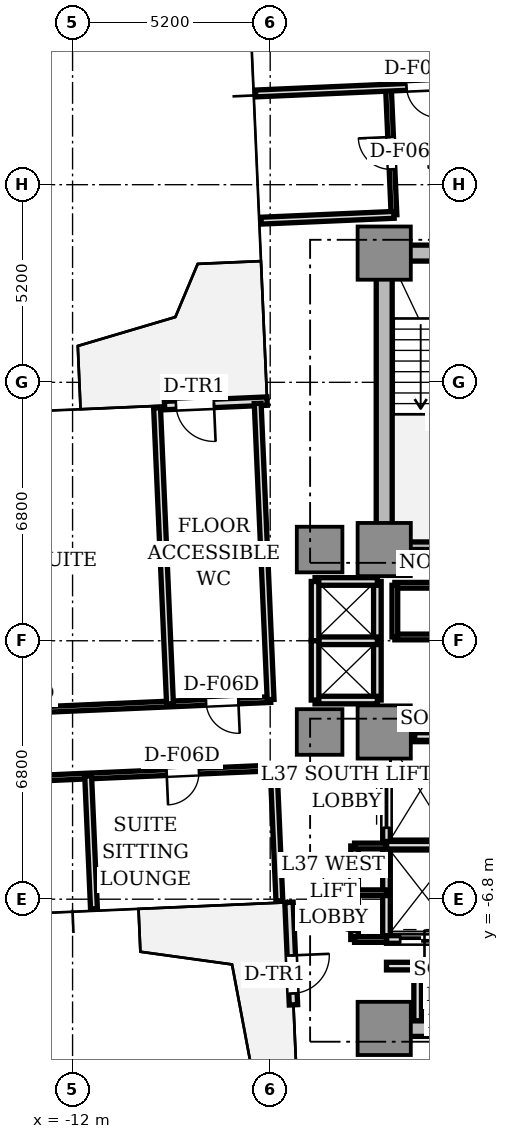
"""IFC4 building model, lengths in metres.
Left out: names, types, materials, properties, quantities, classifications, styles, units other than length and angle.
Written with IfcOpenShell. Run it as: python <this file> out.ifc"""

import sys

from ifc_helpers import new_model, si_unit, direction, frame, frame_2d, origin, origin_2d, place, context, subcontext, project, spatial, rectangle, extrude, source, transform, mapped, element, fill, save


model = new_model("IFC4")
c1 = context("Model", 3, precision=1e-05, world=origin(), true_north=direction((0.0, 1.0)))
c2 = subcontext(c1, "Body", "Model", "MODEL_VIEW")
j1 = project(units=[si_unit("LENGTHUNIT", "METRE"), si_unit("PLANEANGLEUNIT", "RADIAN")], contexts=[c1])
p1 = place(None, origin())
s1 = spatial("IfcSite", under=j1, at=p1, CompositionType="ELEMENT")
p2 = place(p1, origin())
s2 = spatial("IfcBuilding", under=s1, at=p2, CompositionType="ELEMENT")
p3 = place(p2, frame((0.0, 0.0, 134.9)))
s3 = spatial("IfcBuildingStorey", under=s2, at=p3, CompositionType="ELEMENT", Elevation=134.9)
p4 = place(p3, frame((-3.55, 10.2, 0.0), z_axis=(0.0, 0.0, 1.0), x_axis=(1.0, 0.0, 0.0)))
e1 = element("IfcWall", 1, at=p4, inside=s3, PredefinedType="SHEAR", context=c2, shape_type="SweptSolid", body=[
    extrude(rectangle(XDim=7.1, YDim=0.42, at=frame_2d((3.55, 0.0))), origin(), (0.0, 0.0, 1.0), 3.03),
])
p5 = place(p3, frame((-3.8, 2.85, 0.0), z_axis=(0.0, 0.0, 1.0), x_axis=(0.0, 1.0, 0.0)))
e2 = element("IfcWall", 2, at=p5, inside=s3, PredefinedType="SHEAR", context=c2, shape_type="SweptSolid", body=[
    extrude(rectangle(XDim=6.9, YDim=0.42, at=frame_2d((3.45, 0.0))), origin(), (0.0, 0.0, 1.0), 3.03),
])
p6 = place(p3, frame((-3.55, -10.2, 0.0), z_axis=(0.0, 0.0, 1.0), x_axis=(1.0, 0.0, 0.0)))
e3 = element("IfcWall", 3, at=p6, inside=s3, PredefinedType="SHEAR", context=c2, shape_type="SweptSolid", body=[
    extrude(rectangle(XDim=7.1, YDim=0.42, at=frame_2d((3.55, 0.0))), origin(), (0.0, 0.0, 1.0), 3.03),
])
m1 = source(origin(), c2, "Body", "SweptSolid", [
    extrude(rectangle(XDim=1.4, YDim=1.4, at=origin_2d()), origin(), (0.0, 0.0, 1.0), 3.03),
])
for number, where, z_axis, x_axis in (
    (4, (-3.8, 2.4, 0.0), (0.0, 0.0, 1.0), (1.0, 0.0, 0.0)),
    (5, (-3.8, 10.2, 0.0), (0.0, 0.0, 1.0), (1.0, 0.0, 0.0)),
    (6, (-3.8, -2.4, 0.0), (0.0, 0.0, 1.0), (1.0, 0.0, 0.0)),
    (7, (-3.8, -10.2, 0.0), (0.0, 0.0, 1.0), (1.0, 0.0, 0.0)),
):
    element("IfcColumn", number, at=place(p3, frame(where, z_axis=z_axis, x_axis=x_axis)), inside=s3, PredefinedType="COLUMN", context=c2, shape_type="MappedRepresentation", body=[
        mapped(m1, transform((0.0, 0.0, 0.0), scale=1.0)),
    ])
m2 = source(origin(), c2, "Body", "SweptSolid", [
    extrude(rectangle(XDim=1.2, YDim=1.2, at=origin_2d()), origin(), (0.0, 0.0, 1.0), 3.03),
])
for number, where, z_axis, x_axis in (
    (8, (-5.5, 2.4, 0.0), (0.0, 0.0, 1.0), (1.0, 0.0, 0.0)),
    (9, (-5.5, -2.4, 0.0), (0.0, 0.0, 1.0), (1.0, 0.0, 0.0)),
):
    element("IfcColumn", number, at=place(p3, frame(where, z_axis=z_axis, x_axis=x_axis)), inside=s3, PredefinedType="COLUMN", context=c2, shape_type="MappedRepresentation", body=[
        mapped(m2, transform((0.0, 0.0, 0.0), scale=1.0)),
    ])
p7 = place(p3, frame((-6.882, 6.306, 0.0), z_axis=(0.0, 0.0, 1.0), x_axis=(-0.999045894436, -0.043672655174, 0.0)))
e10 = element("IfcWall", 10, at=p7, inside=s3, PredefinedType="STANDARD", context=c2, shape_type="SweptSolid", body=[
    extrude(rectangle(XDim=2.7, YDim=0.22, at=frame_2d((1.35, 0.0))), origin(), (0.0, 0.0, 1.0), 3.03),
])
p8 = place(p7, frame((1.4, 0.0, 0.0)))
e11 = element("IfcOpeningElement", 11, at=p8, cuts=e10, PredefinedType="OPENING", context=c2, shape_type="SweptSolid", body=[
    extrude(rectangle(XDim=1.0, YDim=2.2, at=frame_2d((0.5, 1.1))), frame((0.0, 0.12, 0.0), z_axis=(0.0, -1.0, 0.0), x_axis=(1.0, 0.0, 0.0)), (0.0, 0.0, 1.0), 0.24),
])
p9 = place(p3, frame((-6.306, -6.882, 0.0), z_axis=(0.0, 0.0, 1.0), x_axis=(0.043672655174, -0.999045894436, 0.0)))
e12 = element("IfcWall", 12, at=p9, inside=s3, PredefinedType="STANDARD", context=c2, shape_type="SweptSolid", body=[
    extrude(rectangle(XDim=2.7, YDim=0.22, at=frame_2d((1.35, 0.0))), origin(), (0.0, 0.0, 1.0), 3.03),
])
p10 = place(p9, frame((1.4, 0.0, 0.0)))
e13 = element("IfcOpeningElement", 13, at=p10, cuts=e12, PredefinedType="OPENING", context=c2, shape_type="SweptSolid", body=[
    extrude(rectangle(XDim=1.0, YDim=2.2, at=frame_2d((0.5, 1.1))), frame((0.0, 0.12, 0.0), z_axis=(0.0, -1.0, 0.0), x_axis=(1.0, 0.0, 0.0)), (0.0, 0.0, 1.0), 0.24),
])
p11 = place(p3, frame((-3.72, 2.5, 0.0), z_axis=(0.0, 0.0, 1.0), x_axis=(1.0, 0.0, 0.0)))
e14 = element("IfcWall", 14, at=p11, inside=s3, PredefinedType="SOLIDWALL", context=c2, shape_type="SweptSolid", body=[
    extrude(rectangle(XDim=3.72, YDim=0.2, at=frame_2d((1.86, 0.0))), origin(), (0.0, 0.0, 1.0), 3.03),
])
p12 = place(p3, frame((-3.0, -2.52, 0.0), z_axis=(0.0, 0.0, 1.0), x_axis=(1.0, 0.0, 0.0)))
e15 = element("IfcWall", 15, at=p12, inside=s3, PredefinedType="SOLIDWALL", context=c2, shape_type="SweptSolid", body=[
    extrude(rectangle(XDim=1.0, YDim=0.2, at=frame_2d((0.5, 0.0))), origin(), (0.0, 0.0, 1.0), 2.58),
])
p13 = place(p3, frame((-3.74, -5.36, 0.0), z_axis=(0.0, 0.0, 1.0), x_axis=(0.0, 1.0, 0.0)))
e16 = element("IfcWall", 16, at=p13, inside=s3, PredefinedType="SOLIDWALL", context=c2, shape_type="SweptSolid", body=[
    extrude(rectangle(XDim=2.08, YDim=0.2, at=frame_2d((1.04, 0.0))), origin(), (0.0, 0.0, 1.0), 2.58),
])
p14 = place(p13, frame((0.44, 0.0, 0.0)))
e17 = element("IfcOpeningElement", 17, at=p14, cuts=e16, PredefinedType="OPENING", context=c2, shape_type="SweptSolid", body=[
    extrude(rectangle(XDim=1.2, YDim=2.2, at=frame_2d((0.6, 1.1))), frame((0.0, 0.11, 0.0), z_axis=(0.0, -1.0, 0.0), x_axis=(1.0, 0.0, 0.0)), (0.0, 0.0, 1.0), 0.22),
])
p15 = place(p3, frame((-3.74, -7.86, 0.0), z_axis=(0.0, 0.0, 1.0), x_axis=(0.0, 1.0, 0.0)))
e18 = element("IfcWall", 18, at=p15, inside=s3, PredefinedType="SOLIDWALL", context=c2, shape_type="SweptSolid", body=[
    extrude(rectangle(XDim=2.48, YDim=0.2, at=frame_2d((1.24, 0.0))), origin(), (0.0, 0.0, 1.0), 2.58),
])
p16 = place(p3, frame((-3.74, -7.86, 0.0), z_axis=(0.0, 0.0, 1.0), x_axis=(1.0, 0.0, 0.0)))
e19 = element("IfcWall", 19, at=p16, inside=s3, PredefinedType="SOLIDWALL", context=c2, shape_type="SweptSolid", body=[
    extrude(rectangle(XDim=1.84, YDim=0.2, at=frame_2d((0.92, 0.0))), origin(), (0.0, 0.0, 1.0), 2.58),
])
p17 = place(p16, frame((0.36, 0.0, 0.0)))
e20 = element("IfcOpeningElement", 20, at=p17, cuts=e19, PredefinedType="OPENING", context=c2, shape_type="SweptSolid", body=[
    extrude(rectangle(XDim=1.1, YDim=2.2, at=frame_2d((0.55, 1.1))), frame((0.0, 0.11, 0.0), z_axis=(0.0, -1.0, 0.0), x_axis=(1.0, 0.0, 0.0)), (0.0, 0.0, 1.0), 0.22),
])
p18 = place(p3, frame((-3.74, -5.38, 0.0), z_axis=(0.0, 0.0, 1.0), x_axis=(1.0, 0.0, 0.0)))
e21 = element("IfcWall", 21, at=p18, inside=s3, PredefinedType="SOLIDWALL", context=c2, shape_type="SweptSolid", body=[
    extrude(rectangle(XDim=3.69, YDim=0.2, at=frame_2d((1.845, 0.0))), origin(), (0.0, 0.0, 1.0), 2.58),
])
p19 = place(p3, frame((-3.98, -1.56, 0.0), z_axis=(0.0, 0.0, 1.0), x_axis=(0.0, 1.0, 0.0)))
e22 = element("IfcWall", 22, at=p19, inside=s3, PredefinedType="SOLIDWALL", context=c2, shape_type="SweptSolid", body=[
    extrude(rectangle(XDim=3.12, YDim=0.2, at=frame_2d((1.56, 0.0))), origin(), (0.0, 0.0, 1.0), 2.2),
])
for number, where, z_axis, x_axis in (
    (23, (-5.62, 1.56, 0.0), (0.0, 0.0, 1.0), (1.0, 0.0, 0.0)),
    (24, (-5.62, -1.56, 0.0), (0.0, 0.0, 1.0), (1.0, 0.0, 0.0)),
    (25, (-5.62, 0.0, 0.0), (0.0, 0.0, 1.0), (1.0, 0.0, 0.0)),
):
    element("IfcWall", number, at=place(p3, frame(where, z_axis=z_axis, x_axis=x_axis)), inside=s3, PredefinedType="SOLIDWALL", context=c2, shape_type="SweptSolid", body=[
        extrude(rectangle(XDim=1.64, YDim=0.2, at=frame_2d((0.82, 0.0))), origin(), (0.0, 0.0, 1.0), 2.58),
    ])
for number, where, z_axis, x_axis in (
    (26, (-5.62, 0.0, 0.0), (0.0, 0.0, 1.0), (0.0, 1.0, 0.0)),
    (27, (-5.62, -1.56, 0.0), (0.0, 0.0, 1.0), (0.0, 1.0, 0.0)),
):
    element("IfcWall", number, at=place(p3, frame(where, z_axis=z_axis, x_axis=x_axis)), inside=s3, PredefinedType="SOLIDWALL", context=c2, shape_type="SweptSolid", body=[
        extrude(rectangle(XDim=1.56, YDim=0.2, at=frame_2d((0.78, 0.0))), origin(), (0.0, 0.0, 1.0), 2.58),
    ])
p20 = place(p3, frame((-3.74, -8.56, 0.0), z_axis=(0.0, 0.0, 1.0), x_axis=(1.0, 0.0, 0.0)))
e28 = element("IfcWall", 28, at=p20, inside=s3, PredefinedType="SOLIDWALL", context=c2, shape_type="SweptSolid", body=[
    extrude(rectangle(XDim=3.62, YDim=0.2, at=frame_2d((1.81, 0.0))), origin(), (0.0, 0.0, 1.0), 2.58),
])
p21 = place(p20, frame((1.0, 0.0, 0.0)))
e29 = element("IfcOpeningElement", 29, at=p21, cuts=e28, PredefinedType="OPENING", context=c2, shape_type="SweptSolid", body=[
    extrude(rectangle(XDim=0.95, YDim=2.15, at=frame_2d((0.475, 1.075))), frame((0.0, 0.11, 0.0), z_axis=(0.0, -1.0, 0.0), x_axis=(1.0, 0.0, 0.0)), (0.0, 0.0, 1.0), 0.22),
])
p22 = place(p3, frame((-2.92, -10.0, 0.0), z_axis=(0.0, 0.0, 1.0), x_axis=(0.0, 1.0, 0.0)))
e30 = element("IfcWall", 30, at=p22, inside=s3, PredefinedType="SOLIDWALL", context=c2, shape_type="SweptSolid", body=[
    extrude(rectangle(XDim=1.44, YDim=0.2, at=frame_2d((0.72, 0.0))), origin(), (0.0, 0.0, 1.0), 2.58),
])
p23 = place(p3, frame((-4.58, -7.86, 0.0), z_axis=(0.0, 0.0, 1.0), x_axis=(0.0, 1.0, 0.0)))
e31 = element("IfcWall", 31, at=p23, inside=s3, PredefinedType="SOLIDWALL", context=c2, shape_type="SweptSolid", body=[
    extrude(rectangle(XDim=2.46, YDim=0.2, at=frame_2d((1.23, 0.0))), origin(), (0.0, 0.0, 1.0), 2.58),
])
p24 = place(p23, frame((0.2, 0.0, 0.0)))
e32 = element("IfcOpeningElement", 32, at=p24, cuts=e31, PredefinedType="OPENING", context=c2, shape_type="SweptSolid", body=[
    extrude(rectangle(XDim=0.85, YDim=2.1, at=frame_2d((0.425, 1.05))), frame((0.0, 0.11, 0.0), z_axis=(0.0, -1.0, 0.0), x_axis=(1.0, 0.0, 0.0)), (0.0, 0.0, 1.0), 0.22),
])
p25 = place(p23, frame((1.38, 0.0, 0.0)))
e33 = element("IfcOpeningElement", 33, at=p25, cuts=e31, PredefinedType="OPENING", context=c2, shape_type="SweptSolid", body=[
    extrude(rectangle(XDim=0.85, YDim=2.1, at=frame_2d((0.425, 1.05))), frame((0.0, 0.11, 0.0), z_axis=(0.0, -1.0, 0.0), x_axis=(1.0, 0.0, 0.0)), (0.0, 0.0, 1.0), 0.22),
])
for number, where, z_axis, x_axis in (
    (34, (-4.58, -5.4, 0.0), (0.0, 0.0, 1.0), (1.0, 0.0, 0.0)),
    (35, (-4.58, -7.86, 0.0), (0.0, 0.0, 1.0), (1.0, 0.0, 0.0)),
    (36, (-4.58, -6.63, 0.0), (0.0, 0.0, 1.0), (1.0, 0.0, 0.0)),
):
    element("IfcWall", number, at=place(p3, frame(where, z_axis=z_axis, x_axis=x_axis)), inside=s3, PredefinedType="PARTITIONING", context=c2, shape_type="SweptSolid", body=[
        extrude(rectangle(XDim=0.84, YDim=0.15, at=frame_2d((0.42, 0.0))), origin(), (0.0, 0.0, 1.0), 2.58),
    ])
p26 = place(p3, frame((-3.52, 0.1, 0.0), z_axis=(0.0, 0.0, 1.0), x_axis=(1.0, 0.0, 0.0)))
e37 = element("IfcWall", 37, at=p26, inside=s3, PredefinedType="PARTITIONING", context=c2, shape_type="SweptSolid", body=[
    extrude(rectangle(XDim=3.14, YDim=0.15, at=frame_2d((1.57, 0.0))), origin(), (0.0, 0.0, 1.0), 2.58),
])
p27 = place(p3, frame((-3.52, 1.46, 0.0), z_axis=(0.0, 0.0, 1.0), x_axis=(1.0, 0.0, 0.0)))
e38 = element("IfcWall", 38, at=p27, inside=s3, PredefinedType="PARTITIONING", context=c2, shape_type="SweptSolid", body=[
    extrude(rectangle(XDim=3.14, YDim=0.15, at=frame_2d((1.57, 0.0))), origin(), (0.0, 0.0, 1.0), 2.58),
])
p28 = place(p27, frame((1.05, 0.0, 0.0)))
e39 = element("IfcOpeningElement", 39, at=p28, cuts=e38, PredefinedType="OPENING", context=c2, shape_type="SweptSolid", body=[
    extrude(rectangle(XDim=0.85, YDim=2.1, at=frame_2d((0.425, 1.05))), frame((0.0, 0.085, 0.0), z_axis=(0.0, -1.0, 0.0), x_axis=(1.0, 0.0, 0.0)), (0.0, 0.0, 1.0), 0.17),
])
p29 = place(p3, frame((-3.52, 0.1, 0.0), z_axis=(0.0, 0.0, 1.0), x_axis=(0.0, 1.0, 0.0)))
e40 = element("IfcWall", 40, at=p29, inside=s3, PredefinedType="PARTITIONING", context=c2, shape_type="SweptSolid", body=[
    extrude(rectangle(XDim=1.36, YDim=0.15, at=frame_2d((0.68, 0.0))), origin(), (0.0, 0.0, 1.0), 2.2),
])
p30 = place(p3, frame((-3.542, 11.206, 0.0), z_axis=(0.0, 0.0, 1.0), x_axis=(-0.043582710367, 0.99904982226, 0.0)))
e41 = element("IfcWall", 41, at=p30, inside=s3, PredefinedType="PARTITIONING", context=c2, shape_type="SweptSolid", body=[
    extrude(rectangle(XDim=3.35, YDim=0.15, at=frame_2d((1.675, 0.0))), origin(), (0.0, 0.0, 1.0), 2.58),
])
p31 = place(p30, frame((1.2, 0.0, 0.0)))
e42 = element("IfcOpeningElement", 42, at=p31, cuts=e41, PredefinedType="OPENING", context=c2, shape_type="SweptSolid", body=[
    extrude(rectangle(XDim=0.85, YDim=2.1, at=frame_2d((0.425, 1.05))), frame((0.0, 0.085, 0.0), z_axis=(0.0, -1.0, 0.0), x_axis=(1.0, 0.0, 0.0)), (0.0, 0.0, 1.0), 0.17),
])
p32 = place(p3, frame((-3.542, 11.206, 0.0), z_axis=(0.0, 0.0, 1.0), x_axis=(-0.999046129111, -0.04366728647, 0.0)))
e43 = element("IfcWall", 43, at=p32, inside=s3, PredefinedType="PARTITIONING", context=c2, shape_type="SweptSolid", body=[
    extrude(rectangle(XDim=3.5, YDim=0.18, at=frame_2d((1.75, 0.0))), origin(), (0.0, 0.0, 1.0), 2.58),
])
p33 = place(p3, frame((5.903, 14.972, 0.0), z_axis=(0.0, 0.0, 1.0), x_axis=(-0.999048653727, -0.043609488494, 0.0)))
e44 = element("IfcWall", 44, at=p33, inside=s3, PredefinedType="PARTITIONING", context=c2, shape_type="SweptSolid", body=[
    extrude(rectangle(XDim=13.1, YDim=0.18, at=frame_2d((6.55, 0.0))), origin(), (0.0, 0.0, 1.0), 2.58),
])
p34 = place(p33, frame((8.275, 0.0, 0.0)))
e45 = element("IfcOpeningElement", 45, at=p34, cuts=e44, PredefinedType="OPENING", context=c2, shape_type="SweptSolid", body=[
    extrude(rectangle(XDim=0.85, YDim=2.1, at=frame_2d((0.425, 1.05))), frame((0.0, 0.1, 0.0), z_axis=(0.0, -1.0, 0.0), x_axis=(1.0, 0.0, 0.0)), (0.0, 0.0, 1.0), 0.2),
])
p35 = place(p3, frame((-6.71, -3.346, 0.0), z_axis=(0.0, 0.0, 1.0), x_axis=(-0.999048535483, -0.04361219725, 0.0)))
e46 = element("IfcWall", 46, at=p35, inside=s3, PredefinedType="PARTITIONING", context=c2, shape_type="SweptSolid", body=[
    extrude(rectangle(XDim=13.2, YDim=0.15, at=frame_2d((6.6, 0.0))), origin(), (0.0, 0.0, 1.0), 2.55),
])
p36 = place(p35, frame((1.967, 0.0, 0.0)))
e47 = element("IfcOpeningElement", 47, at=p36, cuts=e46, PredefinedType="OPENING", context=c2, shape_type="SweptSolid", body=[
    extrude(rectangle(XDim=0.85, YDim=2.1, at=frame_2d((0.425, 1.05))), frame((0.0, 0.085, 0.0), z_axis=(0.0, -1.0, 0.0), x_axis=(1.0, 0.0, 0.0)), (0.0, 0.0, 1.0), 0.17),
])
p37 = place(p35, frame((7.342, 0.0, 0.0)))
e48 = element("IfcOpeningElement", 48, at=p37, cuts=e46, PredefinedType="OPENING", context=c2, shape_type="SweptSolid", body=[
    extrude(rectangle(XDim=0.85, YDim=2.1, at=frame_2d((0.425, 1.05))), frame((0.0, 0.085, 0.0), z_axis=(0.0, -1.0, 0.0), x_axis=(1.0, 0.0, 0.0)), (0.0, 0.0, 1.0), 0.17),
])
p38 = place(p3, frame((-6.789, -1.548, 0.0), z_axis=(0.0, 0.0, 1.0), x_axis=(-0.999048500303, -0.043613003123, 0.0)))
e49 = element("IfcWall", 49, at=p38, inside=s3, PredefinedType="PARTITIONING", context=c2, shape_type="SweptSolid", body=[
    extrude(rectangle(XDim=13.2, YDim=0.15, at=frame_2d((6.6, 0.0))), origin(), (0.0, 0.0, 1.0), 2.58),
])
p39 = place(p38, frame((0.85, 0.0, 0.0)))
e50 = element("IfcOpeningElement", 50, at=p39, cuts=e49, PredefinedType="OPENING", context=c2, shape_type="SweptSolid", body=[
    extrude(rectangle(XDim=0.85, YDim=2.1, at=frame_2d((0.425, 1.05))), frame((0.0, 0.085, 0.0), z_axis=(0.0, -1.0, 0.0), x_axis=(1.0, 0.0, 0.0)), (0.0, 0.0, 1.0), 0.17),
])
p40 = place(p38, frame((6.225, 0.0, 0.0)))
e51 = element("IfcOpeningElement", 51, at=p40, cuts=e49, PredefinedType="OPENING", context=c2, shape_type="SweptSolid", body=[
    extrude(rectangle(XDim=0.85, YDim=2.1, at=frame_2d((0.425, 1.05))), frame((0.0, 0.085, 0.0), z_axis=(0.0, -1.0, 0.0), x_axis=(1.0, 0.0, 0.0)), (0.0, 0.0, 1.0), 0.17),
])
p41 = place(p3, frame((-6.71, -3.346, 0.0), z_axis=(0.0, 0.0, 1.0), x_axis=(0.043597663116, -0.999049169846, 0.0)))
e52 = element("IfcWall", 52, at=p41, inside=s3, PredefinedType="PARTITIONING", context=c2, shape_type="SweptSolid", body=[
    extrude(rectangle(XDim=3.5, YDim=0.18, at=frame_2d((1.75, 0.0))), origin(), (0.0, 0.0, 1.0), 2.58),
])
p42 = place(p3, frame((-7.129, 6.245, 0.0), z_axis=(0.0, 0.0, 1.0), x_axis=(0.043600217373, -0.999049058378, 0.0)))
e53 = element("IfcWall", 53, at=p42, inside=s3, PredefinedType="PARTITIONING", context=c2, shape_type="SweptSolid", body=[
    extrude(rectangle(XDim=7.8, YDim=0.18, at=frame_2d((3.9, 0.0))), origin(), (0.0, 0.0, 1.0), 2.58),
])
p43 = place(p3, frame((-11.59, -3.559, 0.0), z_axis=(0.0, 0.0, 1.0), x_axis=(0.04366424353, -0.99904626211, 0.0)))
e54 = element("IfcWall", 54, at=p43, inside=s3, PredefinedType="PARTITIONING", context=c2, shape_type="SweptSolid", body=[
    extrude(rectangle(XDim=3.5, YDim=0.18, at=frame_2d((1.75, 0.0))), origin(), (0.0, 0.0, 1.0), 2.58),
])
p44 = place(p3, frame((-9.436, -1.663, 0.0), z_axis=(0.0, 0.0, 1.0), x_axis=(-0.043632821702, 0.999047634936, 0.0)))
e55 = element("IfcWall", 55, at=p44, inside=s3, PredefinedType="PARTITIONING", context=c2, shape_type="SweptSolid", body=[
    extrude(rectangle(XDim=7.8, YDim=0.18, at=frame_2d((3.9, 0.0))), origin(), (0.0, 0.0, 1.0), 2.58),
])
p45 = place(p3, frame((-3.851, -11.529, 0.0), z_axis=(0.0, 0.0, 1.0), x_axis=(0.999048663393, 0.043609267053, 0.0)))
e56 = element("IfcWall", 56, at=p45, inside=s3, PredefinedType="PARTITIONING", context=c2, shape_type="SweptSolid", body=[
    extrude(rectangle(XDim=10.9, YDim=0.18, at=frame_2d((5.45, 0.0))), origin(), (0.0, 0.0, 1.0), 2.58),
])
m3 = source(origin(), c2, "Body", "SweptSolid", [
    extrude(rectangle(XDim=1.0, YDim=0.05, at=origin_2d()), origin(), (0.0, 0.0, 1.0), 2.2),
])
p46 = place(p8, frame((0.5, 0.0, 0.0)))
e57 = element("IfcDoor", 57, at=p46, inside=s3, OperationType="SINGLE_SWING_LEFT", PredefinedType="DOOR", context=c2, shape_type="MappedRepresentation", body=[
    mapped(m3, transform((0.0, 0.0, 0.0), scale=1.0)),
])
fill(e11, e57)
p47 = place(p10, frame((0.5, 0.0, 0.0)))
e58 = element("IfcDoor", 58, at=p47, inside=s3, OperationType="SINGLE_SWING_LEFT", PredefinedType="DOOR", context=c2, shape_type="MappedRepresentation", body=[
    mapped(m3, transform((0.0, 0.0, 0.0), scale=1.0)),
])
fill(e13, e58)
m4 = source(origin(), c2, "Body", "SweptSolid", [
    extrude(rectangle(XDim=1.2, YDim=0.05, at=origin_2d()), origin(), (0.0, 0.0, 1.0), 2.2),
])
p48 = place(p14, frame((0.6, 0.0, 0.0)))
e59 = element("IfcDoor", 59, at=p48, inside=s3, OperationType="DOUBLE_DOOR_SLIDING", PredefinedType="DOOR", context=c2, shape_type="MappedRepresentation", body=[
    mapped(m4, transform((0.0, 0.0, 0.0), scale=1.0)),
])
fill(e17, e59)
m5 = source(origin(), c2, "Body", "SweptSolid", [
    extrude(rectangle(XDim=1.1, YDim=0.05, at=origin_2d()), origin(), (0.0, 0.0, 1.0), 2.2),
])
p49 = place(p17, frame((0.55, 0.0, 0.0)))
e60 = element("IfcDoor", 60, at=p49, inside=s3, OperationType="DOUBLE_DOOR_SLIDING", PredefinedType="DOOR", context=c2, shape_type="MappedRepresentation", body=[
    mapped(m5, transform((0.0, 0.0, 0.0), scale=1.0)),
])
fill(e20, e60)
m6 = source(origin(), c2, "Body", "SweptSolid", [
    extrude(rectangle(XDim=0.95, YDim=0.05, at=origin_2d()), origin(), (0.0, 0.0, 1.0), 2.15),
])
p50 = place(p21, frame((0.475, 0.0, 0.0)))
e61 = element("IfcDoor", 61, at=p50, inside=s3, OperationType="SINGLE_SWING_LEFT", PredefinedType="DOOR", context=c2, shape_type="MappedRepresentation", body=[
    mapped(m6, transform((0.0, 0.0, 0.0), scale=1.0)),
])
fill(e29, e61)
m7 = source(origin(), c2, "Body", "SweptSolid", [
    extrude(rectangle(XDim=0.85, YDim=0.05, at=origin_2d()), origin(), (0.0, 0.0, 1.0), 2.1),
])
p51 = place(p24, frame((0.425, 0.0, 0.0)))
e62 = element("IfcDoor", 62, at=p51, inside=s3, OperationType="SINGLE_SWING_RIGHT", PredefinedType="DOOR", context=c2, shape_type="MappedRepresentation", body=[
    mapped(m7, transform((0.0, 0.0, 0.0), scale=1.0)),
])
fill(e32, e62)
p52 = place(p25, frame((0.425, 0.0, 0.0)))
e63 = element("IfcDoor", 63, at=p52, inside=s3, OperationType="SINGLE_SWING_LEFT", PredefinedType="DOOR", context=c2, shape_type="MappedRepresentation", body=[
    mapped(m7, transform((0.0, 0.0, 0.0), scale=1.0)),
])
fill(e33, e63)
p53 = place(p31, frame((0.425, 0.0, 0.0)))
e64 = element("IfcDoor", 64, at=p53, inside=s3, OperationType="SINGLE_SWING_RIGHT", PredefinedType="DOOR", context=c2, shape_type="MappedRepresentation", body=[
    mapped(m7, transform((0.0, 0.0, 0.0), scale=1.0)),
])
fill(e42, e64)
p54 = place(p34, frame((0.425, 0.0, 0.0)))
e65 = element("IfcDoor", 65, at=p54, inside=s3, OperationType="SINGLE_SWING_LEFT", PredefinedType="DOOR", context=c2, shape_type="MappedRepresentation", body=[
    mapped(m7, transform((0.0, 0.0, 0.0), scale=1.0)),
])
fill(e45, e65)
p55 = place(p36, frame((0.425, 0.0, 0.0)))
e66 = element("IfcDoor", 66, at=p55, inside=s3, OperationType="SINGLE_SWING_RIGHT", PredefinedType="DOOR", context=c2, shape_type="MappedRepresentation", body=[
    mapped(m7, transform((0.0, 0.0, 0.0), scale=1.0)),
])
fill(e47, e66)
p56 = place(p39, frame((0.425, 0.0, 0.0)))
e67 = element("IfcDoor", 67, at=p56, inside=s3, OperationType="SINGLE_SWING_LEFT", PredefinedType="DOOR", context=c2, shape_type="MappedRepresentation", body=[
    mapped(m7, transform((0.0, 0.0, 0.0), scale=1.0)),
])
fill(e50, e67)
save(model, sys.argv[1])
